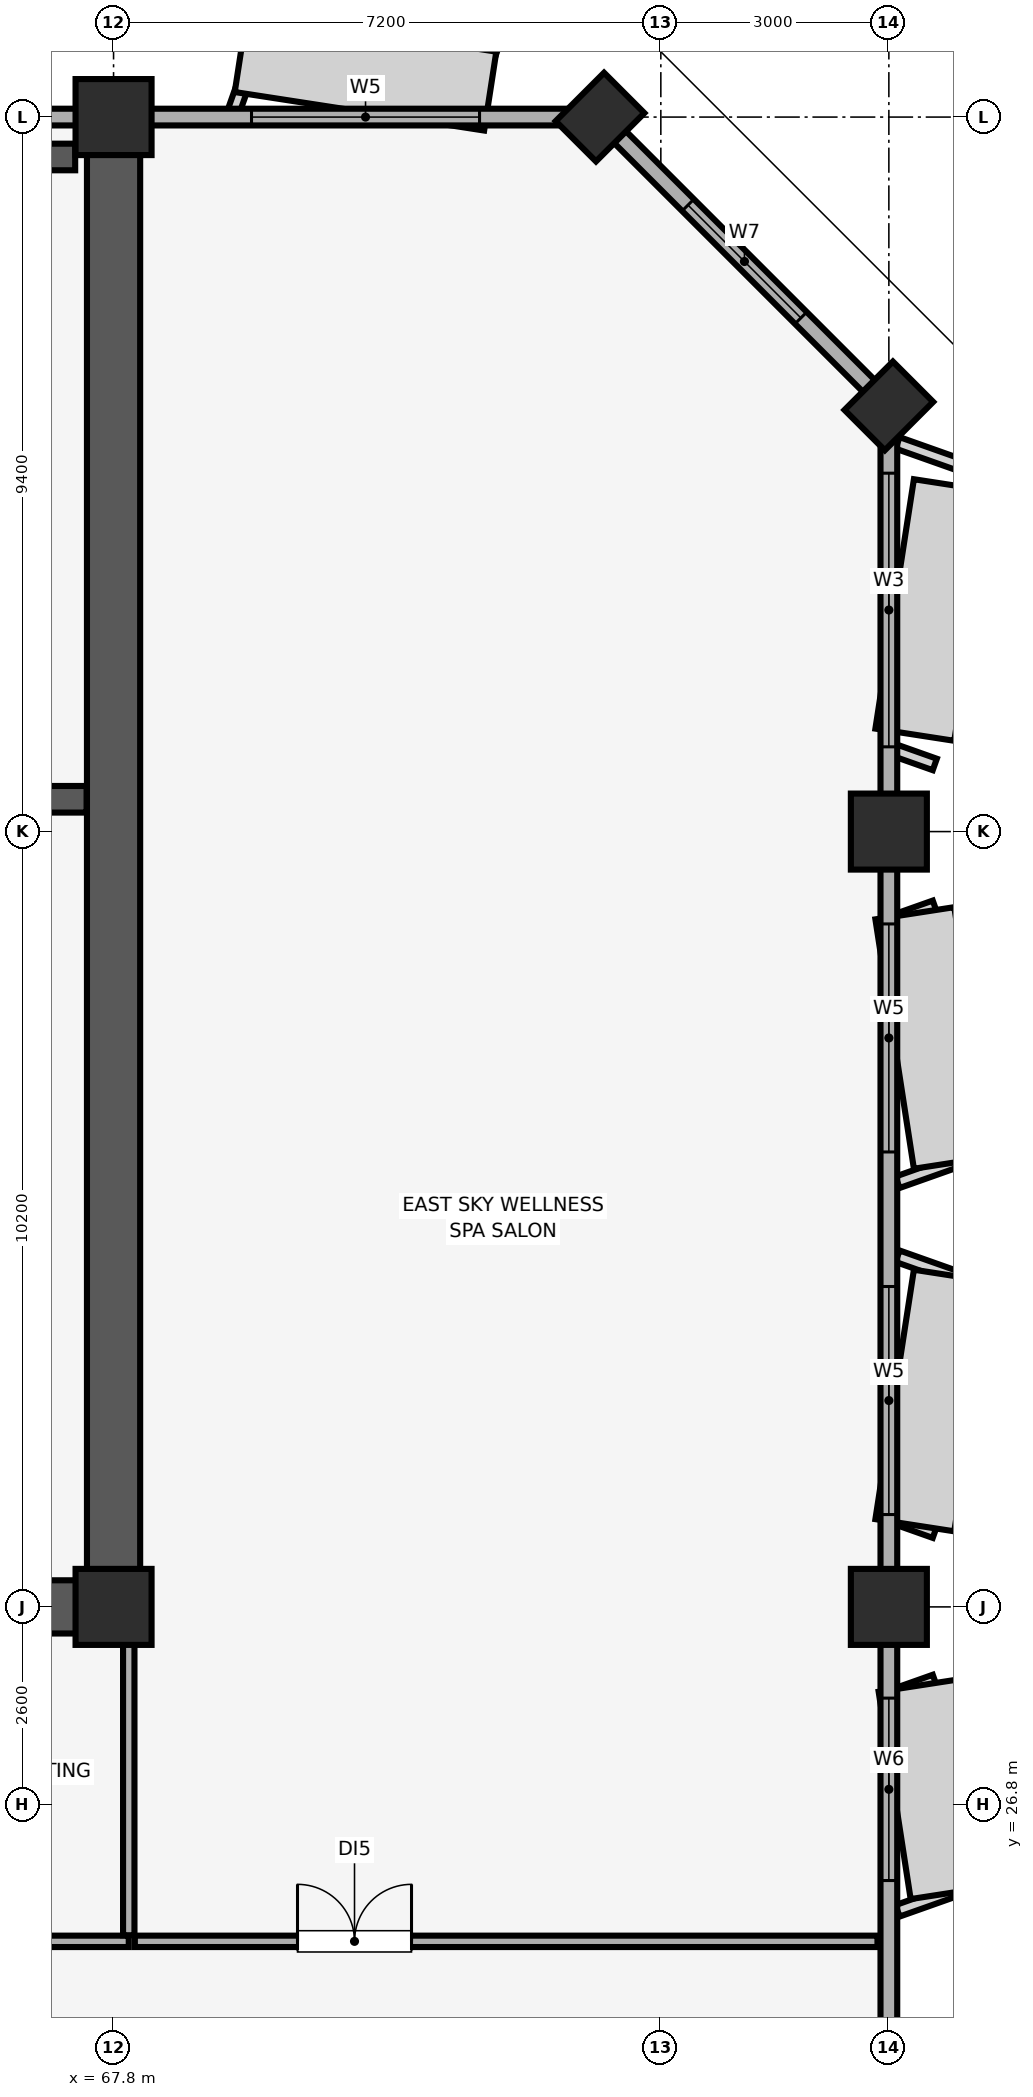
"""IFC4 building model, lengths in metres.
Left out: names, types, materials, properties, quantities, classifications, styles, units other than length and angle.
Written with IfcOpenShell. Run it as: python <this file> out.ifc"""

import sys

from ifc_helpers import new_model, si_unit, direction, frame, frame_2d, origin, origin_2d, place, context, subcontext, project, spatial, rectangle, extrude, element, fill, save


model = new_model("IFC4")
c1 = context("Model", 3, precision=1e-05, world=origin(), true_north=direction((0.0, 1.0)))
c2 = subcontext(c1, "Body", "Model", "MODEL_VIEW")
j1 = project(units=[si_unit("LENGTHUNIT", "METRE"), si_unit("PLANEANGLEUNIT", "RADIAN")], contexts=[c1])
p1 = place(None, origin())
s1 = spatial("IfcSite", under=j1, at=p1, CompositionType="ELEMENT")
p2 = place(p1, origin())
s2 = spatial("IfcBuilding", under=s1, at=p2, CompositionType="ELEMENT")
p3 = place(p2, frame((0.0, 0.0, 276.55)))
s3 = spatial("IfcBuildingStorey", under=s2, at=p3, CompositionType="ELEMENT", Elevation=276.55)
for number, where, z_axis, x_axis in (
    (1, (78.0, 29.4, 0.0), (0.0, 0.0, 1.0), (1.0, 0.0, 0.0)),
    (2, (78.0, 39.6, 0.0), (0.0, 0.0, 1.0), (1.0, 0.0, 0.0)),
):
    element("IfcColumn", number, at=place(p3, frame(where, z_axis=z_axis, x_axis=x_axis)), inside=s3, PredefinedType="COLUMN", context=c2, shape_type="SweptSolid", body=[
        extrude(rectangle(XDim=1.0, YDim=1.0, at=origin_2d()), origin(), (0.0, 0.0, 1.0), 3.6),
    ])
for number, where, z_axis, x_axis in (
    (3, (78.0, 45.2, 0.0), (0.0, 0.0, 1.0), (0.707, 0.707, 0.0)),
    (4, (74.2, 49.0, 0.0), (0.0, 0.0, 1.0), (0.707, 0.707, 0.0)),
):
    element("IfcColumn", number, at=place(p3, frame(where, z_axis=z_axis, x_axis=x_axis)), inside=s3, PredefinedType="PILASTER", context=c2, shape_type="SweptSolid", body=[
        extrude(rectangle(XDim=0.9, YDim=0.75, at=origin_2d()), origin(), (0.0, 0.0, 1.0), 3.6),
    ])
for number, where, z_axis, x_axis in (
    (5, (67.8, 29.4, 0.0), (0.0, 0.0, 1.0), (1.0, 0.0, 0.0)),
    (6, (67.8, 49.0, 0.0), (0.0, 0.0, 1.0), (1.0, 0.0, 0.0)),
):
    element("IfcColumn", number, at=place(p3, frame(where, z_axis=z_axis, x_axis=x_axis)), inside=s3, PredefinedType="COLUMN", context=c2, shape_type="SweptSolid", body=[
        extrude(rectangle(XDim=1.0, YDim=1.0, at=origin_2d()), origin(), (0.0, 0.0, 1.0), 3.6),
    ])
p4 = place(p3, frame((78.0, 9.8, 0.0), z_axis=(0.0, 0.0, 1.0), x_axis=(0.0, 1.0, 0.0)))
e7 = element("IfcWall", 7, at=p4, inside=s3, PredefinedType="SOLIDWALL", context=c2, shape_type="SweptSolid", body=[
    extrude(rectangle(XDim=35.4, YDim=0.22, at=frame_2d((17.7, 0.0))), origin(), (0.0, 0.0, 1.0), 2.8),
])
p5 = place(p4, frame((0.985, 0.0, 0.85)))
e8 = element("IfcOpeningElement", 8, at=p5, cuts=e7, PredefinedType="OPENING", context=c2, shape_type="SweptSolid", body=[
    extrude(rectangle(XDim=3.0, YDim=1.5, at=frame_2d((1.5, 0.75))), frame((0.0, 0.12, 0.0), z_axis=(0.0, -1.0, 0.0), x_axis=(1.0, 0.0, 0.0)), (0.0, 0.0, 1.0), 0.24),
])
p6 = place(p4, frame((7.6, 0.0, 0.85)))
e9 = element("IfcOpeningElement", 9, at=p6, cuts=e7, PredefinedType="OPENING", context=c2, shape_type="SweptSolid", body=[
    extrude(rectangle(XDim=3.6, YDim=1.65, at=frame_2d((1.8, 0.825))), frame((0.0, 0.12, 0.0), z_axis=(0.0, -1.0, 0.0), x_axis=(1.0, 0.0, 0.0)), (0.0, 0.0, 1.0), 0.24),
])
p7 = place(p4, frame((16.0, 0.0, 0.85)))
e10 = element("IfcOpeningElement", 10, at=p7, cuts=e7, PredefinedType="OPENING", context=c2, shape_type="SweptSolid", body=[
    extrude(rectangle(XDim=2.4, YDim=1.5, at=frame_2d((1.2, 0.75))), frame((0.0, 0.12, 0.0), z_axis=(0.0, -1.0, 0.0), x_axis=(1.0, 0.0, 0.0)), (0.0, 0.0, 1.0), 0.24),
])
p8 = place(p4, frame((20.815, 0.0, 0.85)))
e11 = element("IfcOpeningElement", 11, at=p8, cuts=e7, PredefinedType="OPENING", context=c2, shape_type="SweptSolid", body=[
    extrude(rectangle(XDim=3.0, YDim=1.5, at=frame_2d((1.5, 0.75))), frame((0.0, 0.12, 0.0), z_axis=(0.0, -1.0, 0.0), x_axis=(1.0, 0.0, 0.0)), (0.0, 0.0, 1.0), 0.24),
])
p9 = place(p4, frame((25.585, 0.0, 0.85)))
e12 = element("IfcOpeningElement", 12, at=p9, cuts=e7, PredefinedType="OPENING", context=c2, shape_type="SweptSolid", body=[
    extrude(rectangle(XDim=3.0, YDim=1.5, at=frame_2d((1.5, 0.75))), frame((0.0, 0.12, 0.0), z_axis=(0.0, -1.0, 0.0), x_axis=(1.0, 0.0, 0.0)), (0.0, 0.0, 1.0), 0.24),
])
p10 = place(p4, frame((30.915, 0.0, 0.85)))
e13 = element("IfcOpeningElement", 13, at=p10, cuts=e7, PredefinedType="OPENING", context=c2, shape_type="SweptSolid", body=[
    extrude(rectangle(XDim=3.6, YDim=1.65, at=frame_2d((1.8, 0.825))), frame((0.0, 0.12, 0.0), z_axis=(0.0, -1.0, 0.0), x_axis=(1.0, 0.0, 0.0)), (0.0, 0.0, 1.0), 0.24),
])
p11 = place(p3, frame((78.0, 45.2, 0.0), z_axis=(0.0, 0.0, 1.0), x_axis=(-0.707106781187, 0.707106781187, 0.0)))
e14 = element("IfcWall", 14, at=p11, inside=s3, PredefinedType="SOLIDWALL", context=c2, shape_type="SweptSolid", body=[
    extrude(rectangle(XDim=5.374, YDim=0.22, at=frame_2d((2.687, 0.0))), origin(), (0.0, 0.0, 1.0), 2.8),
])
p12 = place(p11, frame((1.637, 0.0, 0.85)))
e15 = element("IfcOpeningElement", 15, at=p12, cuts=e14, PredefinedType="OPENING", context=c2, shape_type="SweptSolid", body=[
    extrude(rectangle(XDim=2.1, YDim=1.6, at=frame_2d((1.05, 0.8))), frame((0.0, 0.12, 0.0), z_axis=(0.0, -1.0, 0.0), x_axis=(1.0, 0.0, 0.0)), (0.0, 0.0, 1.0), 0.24),
])
p13 = place(p3, frame((74.2, 49.0, 0.0), z_axis=(0.0, 0.0, 1.0), x_axis=(-1.0, 0.0, 0.0)))
e16 = element("IfcWall", 16, at=p13, inside=s3, PredefinedType="SOLIDWALL", context=c2, shape_type="SweptSolid", body=[
    extrude(rectangle(XDim=64.4, YDim=0.22, at=frame_2d((32.2, 0.0))), origin(), (0.0, 0.0, 1.0), 2.8),
])
p14 = place(p13, frame((59.815, 0.0, 0.85)))
e17 = element("IfcOpeningElement", 17, at=p14, cuts=e16, PredefinedType="OPENING", context=c2, shape_type="SweptSolid", body=[
    extrude(rectangle(XDim=3.0, YDim=1.5, at=frame_2d((1.5, 0.75))), frame((0.0, 0.12, 0.0), z_axis=(0.0, -1.0, 0.0), x_axis=(1.0, 0.0, 0.0)), (0.0, 0.0, 1.0), 0.24),
])
p15 = place(p13, frame((1.585, 0.0, 0.85)))
e18 = element("IfcOpeningElement", 18, at=p15, cuts=e16, PredefinedType="OPENING", context=c2, shape_type="SweptSolid", body=[
    extrude(rectangle(XDim=3.0, YDim=1.5, at=frame_2d((1.5, 0.75))), frame((0.0, 0.12, 0.0), z_axis=(0.0, -1.0, 0.0), x_axis=(1.0, 0.0, 0.0)), (0.0, 0.0, 1.0), 0.24),
])
p16 = place(p13, frame((46.665, 0.0, 0.9)))
e19 = element("IfcOpeningElement", 19, at=p16, cuts=e16, PredefinedType="OPENING", context=c2, shape_type="SweptSolid", body=[
    extrude(rectangle(XDim=1.5, YDim=1.4, at=frame_2d((0.75, 0.7))), frame((0.0, 0.12, 0.0), z_axis=(0.0, -1.0, 0.0), x_axis=(1.0, 0.0, 0.0)), (0.0, 0.0, 1.0), 0.24),
])
p17 = place(p13, frame((38.85, 0.0, 0.9)))
e20 = element("IfcOpeningElement", 20, at=p17, cuts=e16, PredefinedType="OPENING", context=c2, shape_type="SweptSolid", body=[
    extrude(rectangle(XDim=3.6, YDim=1.5, at=frame_2d((1.8, 0.75))), frame((0.0, 0.12, 0.0), z_axis=(0.0, -1.0, 0.0), x_axis=(1.0, 0.0, 0.0)), (0.0, 0.0, 1.0), 0.24),
])
p18 = place(p13, frame((25.45, 0.0, 0.9)))
e21 = element("IfcOpeningElement", 21, at=p18, cuts=e16, PredefinedType="OPENING", context=c2, shape_type="SweptSolid", body=[
    extrude(rectangle(XDim=1.5, YDim=1.4, at=frame_2d((0.75, 0.7))), frame((0.0, 0.12, 0.0), z_axis=(0.0, -1.0, 0.0), x_axis=(1.0, 0.0, 0.0)), (0.0, 0.0, 1.0), 0.24),
])
p19 = place(p13, frame((21.8, 0.0, 0.9)))
e22 = element("IfcOpeningElement", 22, at=p19, cuts=e16, PredefinedType="OPENING", context=c2, shape_type="SweptSolid", body=[
    extrude(rectangle(XDim=2.4, YDim=1.5, at=frame_2d((1.2, 0.75))), frame((0.0, 0.12, 0.0), z_axis=(0.0, -1.0, 0.0), x_axis=(1.0, 0.0, 0.0)), (0.0, 0.0, 1.0), 0.24),
])
p20 = place(p13, frame((17.435, 0.0, 0.9)))
e23 = element("IfcOpeningElement", 23, at=p20, cuts=e16, PredefinedType="OPENING", context=c2, shape_type="SweptSolid", body=[
    extrude(rectangle(XDim=2.4, YDim=1.5, at=frame_2d((1.2, 0.75))), frame((0.0, 0.12, 0.0), z_axis=(0.0, -1.0, 0.0), x_axis=(1.0, 0.0, 0.0)), (0.0, 0.0, 1.0), 0.24),
])
p21 = place(p3, frame((67.8, 29.4, 0.0), z_axis=(0.0, 0.0, 1.0), x_axis=(0.0, 1.0, 0.0)))
e24 = element("IfcWall", 24, at=p21, inside=s3, PredefinedType="SHEAR", context=c2, shape_type="SweptSolid", body=[
    extrude(rectangle(XDim=19.2, YDim=0.7, at=frame_2d((9.6, 0.0))), origin(), (0.0, 0.0, 1.0), 3.6),
])
p22 = place(p3, frame((60.4, 29.4, 0.0), z_axis=(0.0, 0.0, 1.0), x_axis=(1.0, 0.0, 0.0)))
e25 = element("IfcWall", 25, at=p22, inside=s3, PredefinedType="SHEAR", context=c2, shape_type="SweptSolid", body=[
    extrude(rectangle(XDim=7.045, YDim=0.7, at=frame_2d((3.522, 0.0))), origin(), (0.0, 0.0, 1.0), 3.6),
])
p23 = place(p3, frame((63.145, 40.025, 0.0), z_axis=(0.0, 0.0, 1.0), x_axis=(1.0, 0.0, 0.0)))
e26 = element("IfcWall", 26, at=p23, inside=s3, PredefinedType="SHEAR", context=c2, shape_type="SweptSolid", body=[
    extrude(rectangle(XDim=4.3, YDim=0.35, at=frame_2d((2.15, 0.0))), origin(), (0.0, 0.0, 1.0), 3.6),
])
p24 = place(p23, frame((1.24, 0.0, 0.0)))
e27 = element("IfcOpeningElement", 27, at=p24, cuts=e26, PredefinedType="OPENING", context=c2, shape_type="SweptSolid", body=[
    extrude(rectangle(XDim=1.15, YDim=2.15, at=frame_2d((0.575, 1.075))), frame((0.0, 0.185, 0.0), z_axis=(0.0, -1.0, 0.0), x_axis=(1.0, 0.0, 0.0)), (0.0, 0.0, 1.0), 0.37),
])
p25 = place(p3, frame((63.145, 48.475, 0.0), z_axis=(0.0, 0.0, 1.0), x_axis=(1.0, 0.0, 0.0)))
e28 = element("IfcWall", 28, at=p25, inside=s3, PredefinedType="SHEAR", context=c2, shape_type="SweptSolid", body=[
    extrude(rectangle(XDim=4.15, YDim=0.35, at=frame_2d((2.075, 0.0))), origin(), (0.0, 0.0, 1.0), 3.6),
])
p26 = place(p3, frame((59.0, 25.0, 0.0), z_axis=(0.0, 0.0, 1.0), x_axis=(1.0, 0.0, 0.0)))
e29 = element("IfcWall", 29, at=p26, inside=s3, PredefinedType="PARTITIONING", context=c2, shape_type="SweptSolid", body=[
    extrude(rectangle(XDim=9.0, YDim=0.15, at=frame_2d((4.5, 0.0))), origin(), (0.0, 0.0, 1.0), 3.6),
])
p27 = place(p26, frame((4.0, 0.0, 0.0)))
e30 = element("IfcOpeningElement", 30, at=p27, cuts=e29, PredefinedType="OPENING", context=c2, shape_type="SweptSolid", body=[
    extrude(rectangle(XDim=1.0, YDim=2.15, at=frame_2d((0.5, 1.075))), frame((0.0, 0.085, 0.0), z_axis=(0.0, -1.0, 0.0), x_axis=(1.0, 0.0, 0.0)), (0.0, 0.0, 1.0), 0.17),
])
p28 = place(p3, frame((68.0, 25.08, 0.0), z_axis=(0.0, 0.0, 1.0), x_axis=(0.0, 1.0, 0.0)))
e31 = element("IfcWall", 31, at=p28, inside=s3, PredefinedType="PARTITIONING", context=c2, shape_type="SweptSolid", body=[
    extrude(rectangle(XDim=4.31, YDim=0.15, at=frame_2d((2.155, 0.0))), origin(), (0.0, 0.0, 1.0), 3.1),
])
p29 = place(p3, frame((68.08, 25.0, 0.0), z_axis=(0.0, 0.0, 1.0), x_axis=(1.0, 0.0, 0.0)))
e32 = element("IfcWall", 32, at=p29, inside=s3, PredefinedType="PARTITIONING", context=c2, shape_type="SweptSolid", body=[
    extrude(rectangle(XDim=9.77, YDim=0.15, at=frame_2d((4.885, 0.0))), origin(), (0.0, 0.0, 1.0), 3.6),
])
p30 = place(p29, frame((2.14, 0.0, 0.0)))
e33 = element("IfcOpeningElement", 33, at=p30, cuts=e32, PredefinedType="OPENING", context=c2, shape_type="SweptSolid", body=[
    extrude(rectangle(XDim=1.5, YDim=2.25, at=frame_2d((0.75, 1.125))), frame((0.0, 0.085, 0.0), z_axis=(0.0, -1.0, 0.0), x_axis=(1.0, 0.0, 0.0)), (0.0, 0.0, 1.0), 0.17),
])
p31 = place(p12, origin())
e34 = element("IfcWindow", 34, at=p31, inside=s3, PartitioningType="SINGLE_PANEL", PredefinedType="WINDOW", context=c2, shape_type="SweptSolid", body=[
    extrude(rectangle(XDim=2.1, YDim=1.6, at=frame_2d((1.05, 0.8))), frame((0.0, 0.03, 0.0), z_axis=(0.0, -1.0, 0.0), x_axis=(1.0, 0.0, 0.0)), (0.0, 0.0, 1.0), 0.06),
])
fill(e15, e34)
p32 = place(p7, origin())
e35 = element("IfcWindow", 35, at=p32, inside=s3, PartitioningType="SINGLE_PANEL", PredefinedType="WINDOW", context=c2, shape_type="SweptSolid", body=[
    extrude(rectangle(XDim=2.4, YDim=1.5, at=frame_2d((1.2, 0.75))), frame((0.0, 0.03, 0.0), z_axis=(0.0, -1.0, 0.0), x_axis=(1.0, 0.0, 0.0)), (0.0, 0.0, 1.0), 0.06),
])
fill(e10, e35)
p33 = place(p8, origin())
e36 = element("IfcWindow", 36, at=p33, inside=s3, PartitioningType="SINGLE_PANEL", PredefinedType="WINDOW", context=c2, shape_type="SweptSolid", body=[
    extrude(rectangle(XDim=3.0, YDim=1.5, at=frame_2d((1.5, 0.75))), frame((0.0, 0.03, 0.0), z_axis=(0.0, -1.0, 0.0), x_axis=(1.0, 0.0, 0.0)), (0.0, 0.0, 1.0), 0.06),
])
fill(e11, e36)
p34 = place(p9, origin())
e37 = element("IfcWindow", 37, at=p34, inside=s3, PartitioningType="SINGLE_PANEL", PredefinedType="WINDOW", context=c2, shape_type="SweptSolid", body=[
    extrude(rectangle(XDim=3.0, YDim=1.5, at=frame_2d((1.5, 0.75))), frame((0.0, 0.03, 0.0), z_axis=(0.0, -1.0, 0.0), x_axis=(1.0, 0.0, 0.0)), (0.0, 0.0, 1.0), 0.06),
])
fill(e12, e37)
p35 = place(p10, origin())
e38 = element("IfcWindow", 38, at=p35, inside=s3, PartitioningType="SINGLE_PANEL", PredefinedType="WINDOW", context=c2, shape_type="SweptSolid", body=[
    extrude(rectangle(XDim=3.6, YDim=1.65, at=frame_2d((1.8, 0.825))), frame((0.0, 0.03, 0.0), z_axis=(0.0, -1.0, 0.0), x_axis=(1.0, 0.0, 0.0)), (0.0, 0.0, 1.0), 0.06),
])
fill(e13, e38)
p36 = place(p15, origin())
e39 = element("IfcWindow", 39, at=p36, inside=s3, PartitioningType="SINGLE_PANEL", PredefinedType="WINDOW", context=c2, shape_type="SweptSolid", body=[
    extrude(rectangle(XDim=3.0, YDim=1.5, at=frame_2d((1.5, 0.75))), frame((0.0, 0.03, 0.0), z_axis=(0.0, -1.0, 0.0), x_axis=(1.0, 0.0, 0.0)), (0.0, 0.0, 1.0), 0.06),
])
fill(e18, e39)
p37 = place(p30, origin())
e40 = element("IfcDoor", 40, at=p37, inside=s3, OperationType="DOUBLE_DOOR_SINGLE_SWING", PredefinedType="DOOR", context=c2, shape_type="SweptSolid", body=[
    extrude(rectangle(XDim=1.5, YDim=2.25, at=frame_2d((0.75, 1.125))), frame((0.0, 0.025, 0.0), z_axis=(0.0, -1.0, 0.0), x_axis=(1.0, 0.0, 0.0)), (0.0, 0.0, 1.0), 0.05),
])
fill(e33, e40)
save(model, sys.argv[1])
